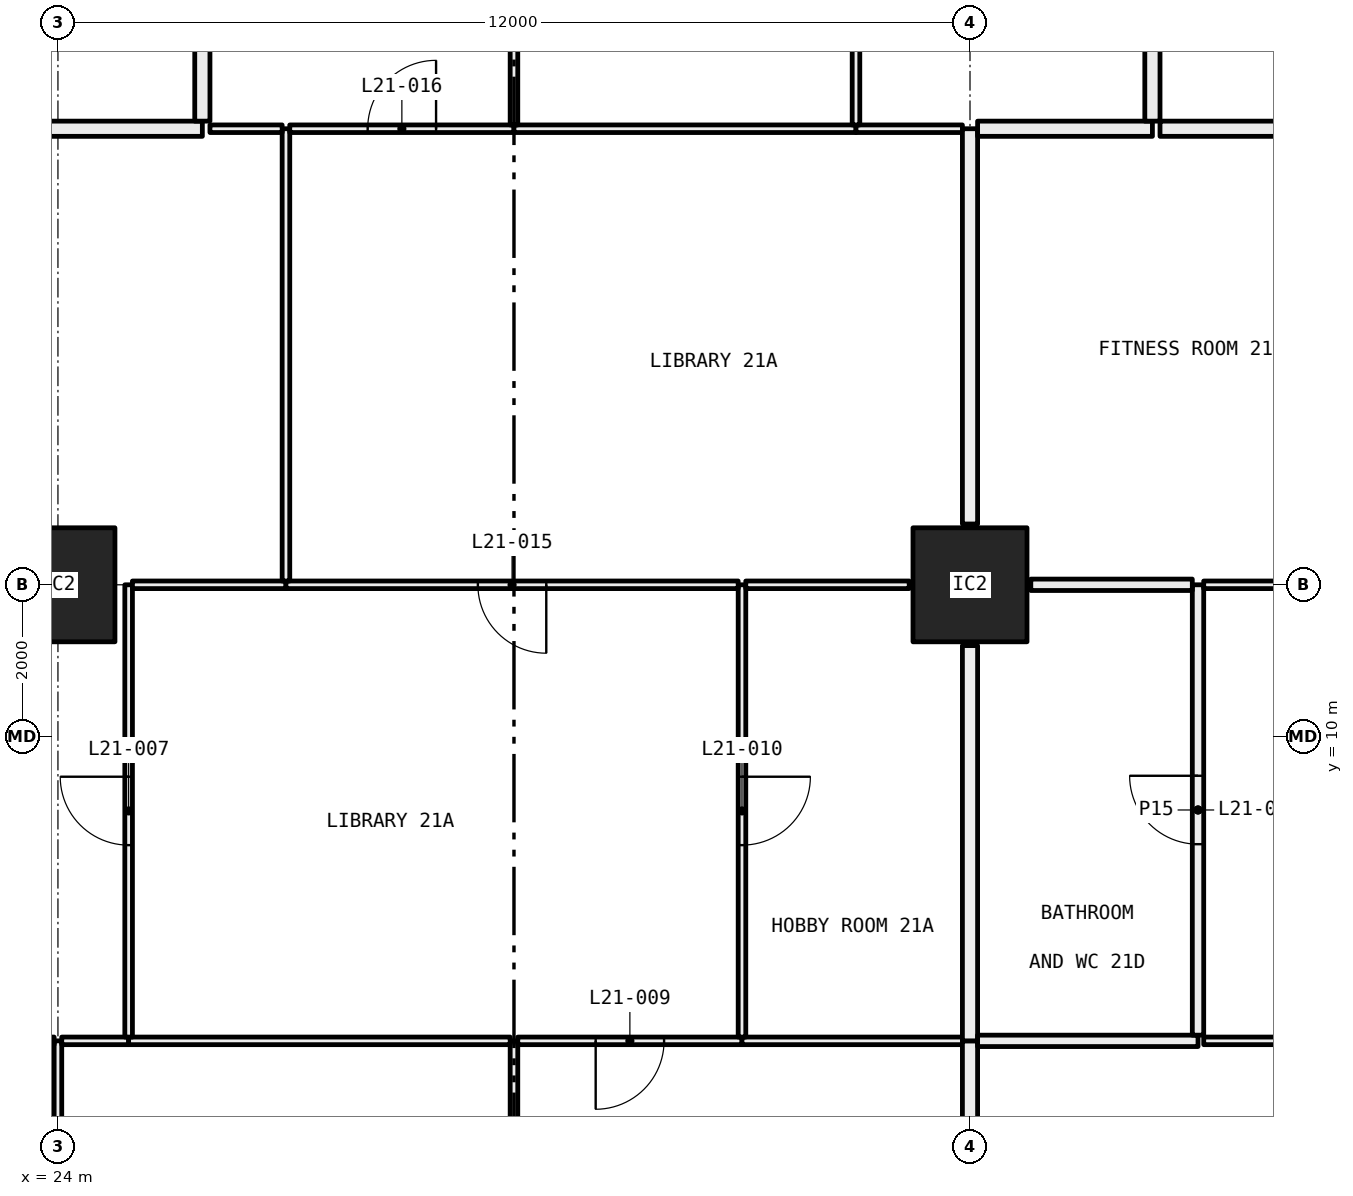
"""IFC4 building model, lengths in metres.
Left out: names, types, materials, properties, quantities, classifications, styles, units other than length and angle.
Written with IfcOpenShell. Run it as: python <this file> out.ifc"""

import sys

from ifc_helpers import new_model, si_unit, direction, frame, frame_2d, origin, origin_2d, place, context, subcontext, project, spatial, rectangle, hollow_rectangle, extrude, element, fill, save


model = new_model("IFC4")
c1 = context("Model", 3, precision=1e-05, world=origin(), true_north=direction((0.0, 1.0)))
c2 = subcontext(c1, "Body", "Model", "MODEL_VIEW")
j1 = project(units=[si_unit("LENGTHUNIT", "METRE"), si_unit("PLANEANGLEUNIT", "RADIAN")], contexts=[c1])
p1 = place(None, origin())
s1 = spatial("IfcSite", under=j1, at=p1, CompositionType="ELEMENT")
p2 = place(p1, origin())
s2 = spatial("IfcBuilding", under=s1, at=p2, CompositionType="ELEMENT")
p3 = place(p2, frame((0.0, 0.0, 85.2)))
s3 = spatial("IfcBuildingStorey", under=s2, at=p3, CompositionType="ELEMENT", Elevation=85.2)
for number, where, z_axis, x_axis in (
    (1, (24.0, 12.0, 0.0), (0.0, 0.0, 1.0), (1.0, 0.0, 0.0)),
    (2, (36.0, 12.0, 0.0), (0.0, 0.0, 1.0), (1.0, 0.0, 0.0)),
):
    element("IfcColumn", number, at=place(p3, frame(where, z_axis=z_axis, x_axis=x_axis)), inside=s3, PredefinedType="COLUMN", context=c2, shape_type="SweptSolid", body=[
        extrude(hollow_rectangle(XDim=1.5, YDim=1.5, WallThickness=0.065, at=origin_2d()), origin(), (0.0, 0.0, 1.0), 3.05),
    ])
p4 = place(p3, frame((24.0, 0.72, 0.0), z_axis=(0.0, 0.0, 1.0), x_axis=(0.0, 1.0, 0.0)))
e3 = element("IfcWall", 3, at=p4, inside=s3, PredefinedType="PARTITIONING", context=c2, shape_type="SweptSolid", body=[
    extrude(rectangle(XDim=5.28, YDim=0.1, at=frame_2d((2.64, 0.0))), origin(), (0.0, 0.0, 1.0), 2.45),
])
p5 = place(p4, frame((2.19, 0.0, 0.0)))
e4 = element("IfcOpeningElement", 4, at=p5, cuts=e3, PredefinedType="OPENING", context=c2, shape_type="SweptSolid", body=[
    extrude(rectangle(XDim=0.9, YDim=2.1, at=frame_2d((0.45, 1.05))), frame((0.0, 0.06, 0.0), z_axis=(0.0, -1.0, 0.0), x_axis=(1.0, 0.0, 0.0)), (0.0, 0.0, 1.0), 0.12),
])
p6 = place(p3, frame((23.95, 6.0, 0.0), z_axis=(0.0, 0.0, 1.0), x_axis=(-1.0, 0.0, 0.0)))
e5 = element("IfcWall", 5, at=p6, inside=s3, PredefinedType="PARTITIONING", context=c2, shape_type="SweptSolid", body=[
    extrude(rectangle(XDim=7.09, YDim=0.1, at=frame_2d((3.545, 0.0))), origin(), (0.0, 0.0, 1.0), 2.45),
])
p7 = place(p3, frame((30.0, 0.72, 0.0), z_axis=(0.0, 0.0, 1.0), x_axis=(0.0, 1.0, 0.0)))
e6 = element("IfcWall", 6, at=p7, inside=s3, PredefinedType="PARTITIONING", context=c2, shape_type="SweptSolid", body=[
    extrude(rectangle(XDim=5.28, YDim=0.1, at=frame_2d((2.64, 0.0))), origin(), (0.0, 0.0, 1.0), 3.05),
])
p8 = place(p3, frame((24.93, 6.0, 0.0), z_axis=(0.0, 0.0, 1.0), x_axis=(-1.0, 0.0, 0.0)))
e7 = element("IfcWall", 7, at=p8, inside=s3, PredefinedType="PARTITIONING", context=c2, shape_type="SweptSolid", body=[
    extrude(rectangle(XDim=0.88, YDim=0.1, at=frame_2d((0.44, 0.0))), origin(), (0.0, 0.0, 1.0), 2.45),
])
p9 = place(p3, frame((29.95, 6.0, 0.0), z_axis=(0.0, 0.0, 1.0), x_axis=(-1.0, 0.0, 0.0)))
e8 = element("IfcWall", 8, at=p9, inside=s3, PredefinedType="PARTITIONING", context=c2, shape_type="SweptSolid", body=[
    extrude(rectangle(XDim=5.02, YDim=0.1, at=frame_2d((2.51, 0.0))), origin(), (0.0, 0.0, 1.0), 3.05),
])
p10 = place(p3, frame((33.0, 6.0, 0.0), z_axis=(0.0, 0.0, 1.0), x_axis=(-1.0, 0.0, 0.0)))
e9 = element("IfcWall", 9, at=p10, inside=s3, PredefinedType="PARTITIONING", context=c2, shape_type="SweptSolid", body=[
    extrude(rectangle(XDim=2.95, YDim=0.1, at=frame_2d((1.475, 0.0))), origin(), (0.0, 0.0, 1.0), 3.05),
])
p11 = place(p10, frame((1.025, 0.0, 0.0)))
e10 = element("IfcOpeningElement", 10, at=p11, cuts=e9, PredefinedType="OPENING", context=c2, shape_type="SweptSolid", body=[
    extrude(rectangle(XDim=0.9, YDim=2.1, at=frame_2d((0.45, 1.05))), frame((0.0, 0.06, 0.0), z_axis=(0.0, -1.0, 0.0), x_axis=(1.0, 0.0, 0.0)), (0.0, 0.0, 1.0), 0.12),
])
p12 = place(p3, frame((35.9, 6.0, 0.0), z_axis=(0.0, 0.0, 1.0), x_axis=(-1.0, 0.0, 0.0)))
e11 = element("IfcWall", 11, at=p12, inside=s3, PredefinedType="PARTITIONING", context=c2, shape_type="SweptSolid", body=[
    extrude(rectangle(XDim=2.9, YDim=0.1, at=frame_2d((1.45, 0.0))), origin(), (0.0, 0.0, 1.0), 3.05),
])
p13 = place(p3, frame((36.0, 0.72, 0.0), z_axis=(0.0, 0.0, 1.0), x_axis=(0.0, 1.0, 0.0)))
e12 = element("IfcWall", 12, at=p13, inside=s3, PredefinedType="PARTITIONING", context=c2, shape_type="SweptSolid", body=[
    extrude(rectangle(XDim=5.28, YDim=0.2, at=frame_2d((2.64, 0.0))), origin(), (0.0, 0.0, 1.0), 2.45),
])
p14 = place(p3, frame((24.93, 6.05, 0.0), z_axis=(0.0, 0.0, 1.0), x_axis=(0.0, 1.0, 0.0)))
e13 = element("IfcWall", 13, at=p14, inside=s3, PredefinedType="PARTITIONING", context=c2, shape_type="SweptSolid", body=[
    extrude(rectangle(XDim=5.95, YDim=0.1, at=frame_2d((2.975, 0.0))), origin(), (0.0, 0.0, 1.0), 2.45),
])
p15 = place(p14, frame((2.525, 0.0, 0.0)))
e14 = element("IfcOpeningElement", 14, at=p15, cuts=e13, PredefinedType="OPENING", context=c2, shape_type="SweptSolid", body=[
    extrude(rectangle(XDim=0.9, YDim=2.1, at=frame_2d((0.45, 1.05))), frame((0.0, 0.06, 0.0), z_axis=(0.0, -1.0, 0.0), x_axis=(1.0, 0.0, 0.0)), (0.0, 0.0, 1.0), 0.12),
])
p16 = place(p3, frame((33.0, 6.05, 0.0), z_axis=(0.0, 0.0, 1.0), x_axis=(0.0, 1.0, 0.0)))
e15 = element("IfcWall", 15, at=p16, inside=s3, PredefinedType="PARTITIONING", context=c2, shape_type="SweptSolid", body=[
    extrude(rectangle(XDim=5.95, YDim=0.1, at=frame_2d((2.975, 0.0))), origin(), (0.0, 0.0, 1.0), 2.45),
])
p17 = place(p16, frame((2.525, 0.0, 0.0)))
e16 = element("IfcOpeningElement", 16, at=p17, cuts=e15, PredefinedType="OPENING", context=c2, shape_type="SweptSolid", body=[
    extrude(rectangle(XDim=0.9, YDim=2.1, at=frame_2d((0.45, 1.05))), frame((0.0, 0.06, 0.0), z_axis=(0.0, -1.0, 0.0), x_axis=(1.0, 0.0, 0.0)), (0.0, 0.0, 1.0), 0.12),
])
p18 = place(p3, frame((27.0, 12.0, 0.0), z_axis=(0.0, 0.0, 1.0), x_axis=(-1.0, 0.0, 0.0)))
e17 = element("IfcWall", 17, at=p18, inside=s3, PredefinedType="PARTITIONING", context=c2, shape_type="SweptSolid", body=[
    extrude(rectangle(XDim=2.02, YDim=0.1, at=frame_2d((1.01, 0.0))), origin(), (0.0, 0.0, 1.0), 2.45),
])
p19 = place(p3, frame((32.95, 12.0, 0.0), z_axis=(0.0, 0.0, 1.0), x_axis=(-1.0, 0.0, 0.0)))
e18 = element("IfcWall", 18, at=p19, inside=s3, PredefinedType="PARTITIONING", context=c2, shape_type="SweptSolid", body=[
    extrude(rectangle(XDim=5.95, YDim=0.1, at=frame_2d((2.975, 0.0))), origin(), (0.0, 0.0, 1.0), 2.45),
])
p20 = place(p19, frame((2.525, 0.0, 0.0)))
e19 = element("IfcOpeningElement", 19, at=p20, cuts=e18, PredefinedType="OPENING", context=c2, shape_type="SweptSolid", body=[
    extrude(rectangle(XDim=0.9, YDim=2.1, at=frame_2d((0.45, 1.05))), frame((0.0, 0.06, 0.0), z_axis=(0.0, -1.0, 0.0), x_axis=(1.0, 0.0, 0.0)), (0.0, 0.0, 1.0), 0.12),
])
p21 = place(p3, frame((35.2, 12.0, 0.0), z_axis=(0.0, 0.0, 1.0), x_axis=(-1.0, 0.0, 0.0)))
e20 = element("IfcWall", 20, at=p21, inside=s3, PredefinedType="PARTITIONING", context=c2, shape_type="SweptSolid", body=[
    extrude(rectangle(XDim=2.15, YDim=0.1, at=frame_2d((1.075, 0.0))), origin(), (0.0, 0.0, 1.0), 2.45),
])
p22 = place(p3, frame((36.0, 6.0, 0.0), z_axis=(0.0, 0.0, 1.0), x_axis=(0.0, 1.0, 0.0)))
e21 = element("IfcWall", 21, at=p22, inside=s3, PredefinedType="PARTITIONING", context=c2, shape_type="SweptSolid", body=[
    extrude(rectangle(XDim=5.2, YDim=0.2, at=frame_2d((2.6, 0.0))), origin(), (0.0, 0.0, 1.0), 2.45),
])
p23 = place(p3, frame((27.0, 12.05, 0.0), z_axis=(0.0, 0.0, 1.0), x_axis=(0.0, 1.0, 0.0)))
e22 = element("IfcWall", 22, at=p23, inside=s3, PredefinedType="PARTITIONING", context=c2, shape_type="SweptSolid", body=[
    extrude(rectangle(XDim=5.95, YDim=0.1, at=frame_2d((2.975, 0.0))), origin(), (0.0, 0.0, 1.0), 2.45),
])
p24 = place(p3, frame((26.95, 18.0, 0.0), z_axis=(0.0, 0.0, 1.0), x_axis=(-1.0, 0.0, 0.0)))
e23 = element("IfcWall", 23, at=p24, inside=s3, PredefinedType="PARTITIONING", context=c2, shape_type="SweptSolid", body=[
    extrude(rectangle(XDim=0.95, YDim=0.1, at=frame_2d((0.475, 0.0))), origin(), (0.0, 0.0, 1.0), 3.05),
])
p25 = place(p3, frame((25.9, 18.0, 0.0), z_axis=(0.0, 0.0, 1.0), x_axis=(-1.0, 0.0, 0.0)))
e24 = element("IfcWall", 24, at=p25, inside=s3, PredefinedType="PARTITIONING", context=c2, shape_type="SweptSolid", body=[
    extrude(rectangle(XDim=6.4, YDim=0.2, at=frame_2d((3.2, 0.0))), origin(), (0.0, 0.0, 1.0), 3.05),
])
p26 = place(p3, frame((30.0, 18.0, 0.0), z_axis=(0.0, 0.0, 1.0), x_axis=(-1.0, 0.0, 0.0)))
e25 = element("IfcWall", 25, at=p26, inside=s3, PredefinedType="PARTITIONING", context=c2, shape_type="SweptSolid", body=[
    extrude(rectangle(XDim=2.95, YDim=0.1, at=frame_2d((1.475, 0.0))), origin(), (0.0, 0.0, 1.0), 3.05),
])
p27 = place(p26, frame((1.025, 0.0, 0.0)))
e26 = element("IfcOpeningElement", 26, at=p27, cuts=e25, PredefinedType="OPENING", context=c2, shape_type="SweptSolid", body=[
    extrude(rectangle(XDim=0.9, YDim=2.1, at=frame_2d((0.45, 1.05))), frame((0.0, 0.06, 0.0), z_axis=(0.0, -1.0, 0.0), x_axis=(1.0, 0.0, 0.0)), (0.0, 0.0, 1.0), 0.12),
])
p28 = place(p3, frame((34.5, 18.0, 0.0), z_axis=(0.0, 0.0, 1.0), x_axis=(-1.0, 0.0, 0.0)))
e27 = element("IfcWall", 27, at=p28, inside=s3, PredefinedType="PARTITIONING", context=c2, shape_type="SweptSolid", body=[
    extrude(rectangle(XDim=4.5, YDim=0.1, at=frame_2d((2.25, 0.0))), origin(), (0.0, 0.0, 1.0), 3.05),
])
p29 = place(p3, frame((35.9, 18.0, 0.0), z_axis=(0.0, 0.0, 1.0), x_axis=(-1.0, 0.0, 0.0)))
e28 = element("IfcWall", 28, at=p29, inside=s3, PredefinedType="PARTITIONING", context=c2, shape_type="SweptSolid", body=[
    extrude(rectangle(XDim=1.4, YDim=0.1, at=frame_2d((0.7, 0.0))), origin(), (0.0, 0.0, 1.0), 3.05),
])
p30 = place(p3, frame((36.0, 12.8, 0.0), z_axis=(0.0, 0.0, 1.0), x_axis=(0.0, 1.0, 0.0)))
e29 = element("IfcWall", 29, at=p30, inside=s3, PredefinedType="PARTITIONING", context=c2, shape_type="SweptSolid", body=[
    extrude(rectangle(XDim=5.2, YDim=0.2, at=frame_2d((2.6, 0.0))), origin(), (0.0, 0.0, 1.0), 2.45),
])
p31 = place(p3, frame((30.0, 18.05, 0.0), z_axis=(0.0, 0.0, 1.0), x_axis=(0.0, 1.0, 0.0)))
e30 = element("IfcWall", 30, at=p31, inside=s3, PredefinedType="PARTITIONING", context=c2, shape_type="SweptSolid", body=[
    extrude(rectangle(XDim=6.175, YDim=0.1, at=frame_2d((3.087, 0.0))), origin(), (0.0, 0.0, 1.0), 2.45),
])
p32 = place(p31, frame((2.637, 0.0, 0.0)))
e31 = element("IfcOpeningElement", 31, at=p32, cuts=e30, PredefinedType="OPENING", context=c2, shape_type="SweptSolid", body=[
    extrude(rectangle(XDim=0.9, YDim=2.1, at=frame_2d((0.45, 1.05))), frame((0.0, 0.06, 0.0), z_axis=(0.0, -1.0, 0.0), x_axis=(1.0, 0.0, 0.0)), (0.0, 0.0, 1.0), 0.12),
])
p33 = place(p3, frame((25.9, 23.9, 0.0), z_axis=(0.0, 0.0, 1.0), x_axis=(0.0, -1.0, 0.0)))
e32 = element("IfcWall", 32, at=p33, inside=s3, PredefinedType="PARTITIONING", context=c2, shape_type="SweptSolid", body=[
    extrude(rectangle(XDim=5.8, YDim=0.2, at=frame_2d((2.9, 0.0))), origin(), (0.0, 0.0, 1.0), 3.05),
])
p34 = place(p3, frame((34.5, 18.05, 0.0), z_axis=(0.0, 0.0, 1.0), x_axis=(0.0, 1.0, 0.0)))
e33 = element("IfcWall", 33, at=p34, inside=s3, PredefinedType="PARTITIONING", context=c2, shape_type="SweptSolid", body=[
    extrude(rectangle(XDim=6.25, YDim=0.1, at=frame_2d((3.125, 0.0))), origin(), (0.0, 0.0, 1.0), 2.45),
])
p35 = place(p34, frame((2.675, 0.0, 0.0)))
e34 = element("IfcOpeningElement", 34, at=p35, cuts=e33, PredefinedType="OPENING", context=c2, shape_type="SweptSolid", body=[
    extrude(rectangle(XDim=0.9, YDim=2.1, at=frame_2d((0.45, 1.05))), frame((0.0, 0.06, 0.0), z_axis=(0.0, -1.0, 0.0), x_axis=(1.0, 0.0, 0.0)), (0.0, 0.0, 1.0), 0.12),
])
p36 = place(p3, frame((36.1, 18.0, 0.0), z_axis=(0.0, 0.0, 1.0), x_axis=(1.0, 0.0, 0.0)))
e35 = element("IfcWall", 35, at=p36, inside=s3, PredefinedType="PARTITIONING", context=c2, shape_type="SweptSolid", body=[
    extrude(rectangle(XDim=2.3, YDim=0.2, at=frame_2d((1.15, 0.0))), origin(), (0.0, 0.0, 1.0), 3.05),
])
p37 = place(p3, frame((38.4, 18.1, 0.0), z_axis=(0.0, 0.0, 1.0), x_axis=(0.0, 1.0, 0.0)))
e36 = element("IfcWall", 36, at=p37, inside=s3, PredefinedType="PARTITIONING", context=c2, shape_type="SweptSolid", body=[
    extrude(rectangle(XDim=6.2, YDim=0.2, at=frame_2d((3.1, 0.0))), origin(), (0.0, 0.0, 1.0), 2.45),
])
p38 = place(p3, frame((39.0, 6.0, 0.0), z_axis=(0.0, 0.0, 1.0), x_axis=(-1.0, 0.0, 0.0)))
e37 = element("IfcWall", 37, at=p38, inside=s3, PredefinedType="PARTITIONING", context=c2, shape_type="SweptSolid", body=[
    extrude(rectangle(XDim=2.9, YDim=0.15, at=frame_2d((1.45, 0.0))), origin(), (0.0, 0.0, 1.0), 3.05),
])
p39 = place(p3, frame((41.95, 6.0, 0.0), z_axis=(0.0, 0.0, 1.0), x_axis=(-1.0, 0.0, 0.0)))
e38 = element("IfcWall", 38, at=p39, inside=s3, PredefinedType="PARTITIONING", context=c2, shape_type="SweptSolid", body=[
    extrude(rectangle(XDim=2.875, YDim=0.1, at=frame_2d((1.438, 0.0))), origin(), (0.0, 0.0, 1.0), 3.05),
])
p40 = place(p3, frame((39.0, 6.075, 0.0), z_axis=(0.0, 0.0, 1.0), x_axis=(0.0, 1.0, 0.0)))
e39 = element("IfcWall", 39, at=p40, inside=s3, PredefinedType="PARTITIONING", context=c2, shape_type="SweptSolid", body=[
    extrude(rectangle(XDim=5.925, YDim=0.15, at=frame_2d((2.962, 0.0))), origin(), (0.0, 0.0, 1.0), 2.45),
])
p41 = place(p40, frame((2.512, 0.0, 0.0)))
e40 = element("IfcOpeningElement", 40, at=p41, cuts=e39, PredefinedType="OPENING", context=c2, shape_type="SweptSolid", body=[
    extrude(rectangle(XDim=0.9, YDim=2.1, at=frame_2d((0.45, 1.05))), frame((0.0, 0.085, 0.0), z_axis=(0.0, -1.0, 0.0), x_axis=(1.0, 0.0, 0.0)), (0.0, 0.0, 1.0), 0.17),
])
p42 = place(p3, frame((38.925, 12.0, 0.0), z_axis=(0.0, 0.0, 1.0), x_axis=(-1.0, 0.0, 0.0)))
e41 = element("IfcWall", 41, at=p42, inside=s3, PredefinedType="PARTITIONING", context=c2, shape_type="SweptSolid", body=[
    extrude(rectangle(XDim=2.125, YDim=0.15, at=frame_2d((1.062, 0.0))), origin(), (0.0, 0.0, 1.0), 2.45),
])
p43 = place(p3, frame((42.0, 12.0, 0.0), z_axis=(0.0, 0.0, 1.0), x_axis=(-1.0, 0.0, 0.0)))
e42 = element("IfcWall", 42, at=p43, inside=s3, PredefinedType="PARTITIONING", context=c2, shape_type="SweptSolid", body=[
    extrude(rectangle(XDim=2.925, YDim=0.1, at=frame_2d((1.462, 0.0))), origin(), (0.0, 0.0, 1.0), 2.45),
])
p44 = place(p43, frame((1.012, 0.0, 0.0)))
e43 = element("IfcOpeningElement", 43, at=p44, cuts=e42, PredefinedType="OPENING", context=c2, shape_type="SweptSolid", body=[
    extrude(rectangle(XDim=0.9, YDim=2.1, at=frame_2d((0.45, 1.05))), frame((0.0, 0.06, 0.0), z_axis=(0.0, -1.0, 0.0), x_axis=(1.0, 0.0, 0.0)), (0.0, 0.0, 1.0), 0.12),
])
p45 = place(p3, frame((40.8, 18.0, 0.0), z_axis=(0.0, 0.0, 1.0), x_axis=(-1.0, 0.0, 0.0)))
e44 = element("IfcWall", 44, at=p45, inside=s3, PredefinedType="PARTITIONING", context=c2, shape_type="SweptSolid", body=[
    extrude(rectangle(XDim=2.3, YDim=0.2, at=frame_2d((1.15, 0.0))), origin(), (0.0, 0.0, 1.0), 3.05),
])
p46 = place(p15, origin())
e45 = element("IfcDoor", 45, at=p46, inside=s3, OperationType="SINGLE_SWING_LEFT", PredefinedType="DOOR", context=c2, shape_type="SweptSolid", body=[
    extrude(rectangle(XDim=0.9, YDim=2.1, at=frame_2d((0.45, 1.05))), frame((0.0, 0.025, 0.0), z_axis=(0.0, -1.0, 0.0), x_axis=(1.0, 0.0, 0.0)), (0.0, 0.0, 1.0), 0.05),
])
fill(e14, e45)
p47 = place(p11, origin())
e46 = element("IfcDoor", 46, at=p47, inside=s3, OperationType="SINGLE_SWING_LEFT", PredefinedType="DOOR", context=c2, shape_type="SweptSolid", body=[
    extrude(rectangle(XDim=0.9, YDim=2.1, at=frame_2d((0.45, 1.05))), frame((0.0, 0.025, 0.0), z_axis=(0.0, -1.0, 0.0), x_axis=(1.0, 0.0, 0.0)), (0.0, 0.0, 1.0), 0.05),
])
fill(e10, e46)
p48 = place(p17, frame((0.9, 0.0, 0.0), x_axis=(-1.0, 0.0, 0.0)))
e47 = element("IfcDoor", 47, at=p48, inside=s3, OperationType="SINGLE_SWING_RIGHT", PredefinedType="DOOR", context=c2, shape_type="SweptSolid", body=[
    extrude(rectangle(XDim=0.9, YDim=2.1, at=frame_2d((0.45, 1.05))), frame((0.0, 0.025, 0.0), z_axis=(0.0, -1.0, 0.0), x_axis=(1.0, 0.0, 0.0)), (0.0, 0.0, 1.0), 0.05),
])
fill(e16, e47)
p49 = place(p20, origin())
e48 = element("IfcDoor", 48, at=p49, inside=s3, OperationType="SINGLE_SWING_RIGHT", PredefinedType="DOOR", context=c2, shape_type="SweptSolid", body=[
    extrude(rectangle(XDim=0.9, YDim=2.1, at=frame_2d((0.45, 1.05))), frame((0.0, 0.025, 0.0), z_axis=(0.0, -1.0, 0.0), x_axis=(1.0, 0.0, 0.0)), (0.0, 0.0, 1.0), 0.05),
])
fill(e19, e48)
p50 = place(p27, frame((0.9, 0.0, 0.0), x_axis=(-1.0, 0.0, 0.0)))
e49 = element("IfcDoor", 49, at=p50, inside=s3, OperationType="SINGLE_SWING_LEFT", PredefinedType="DOOR", context=c2, shape_type="SweptSolid", body=[
    extrude(rectangle(XDim=0.9, YDim=2.1, at=frame_2d((0.45, 1.05))), frame((0.0, 0.025, 0.0), z_axis=(0.0, -1.0, 0.0), x_axis=(1.0, 0.0, 0.0)), (0.0, 0.0, 1.0), 0.05),
])
fill(e26, e49)
p51 = place(p41, origin())
e50 = element("IfcDoor", 50, at=p51, inside=s3, OperationType="SINGLE_SWING_LEFT", PredefinedType="DOOR", context=c2, shape_type="SweptSolid", body=[
    extrude(rectangle(XDim=0.9, YDim=2.1, at=frame_2d((0.45, 1.05))), frame((0.0, 0.025, 0.0), z_axis=(0.0, -1.0, 0.0), x_axis=(1.0, 0.0, 0.0)), (0.0, 0.0, 1.0), 0.05),
])
fill(e40, e50)
save(model, sys.argv[1])
